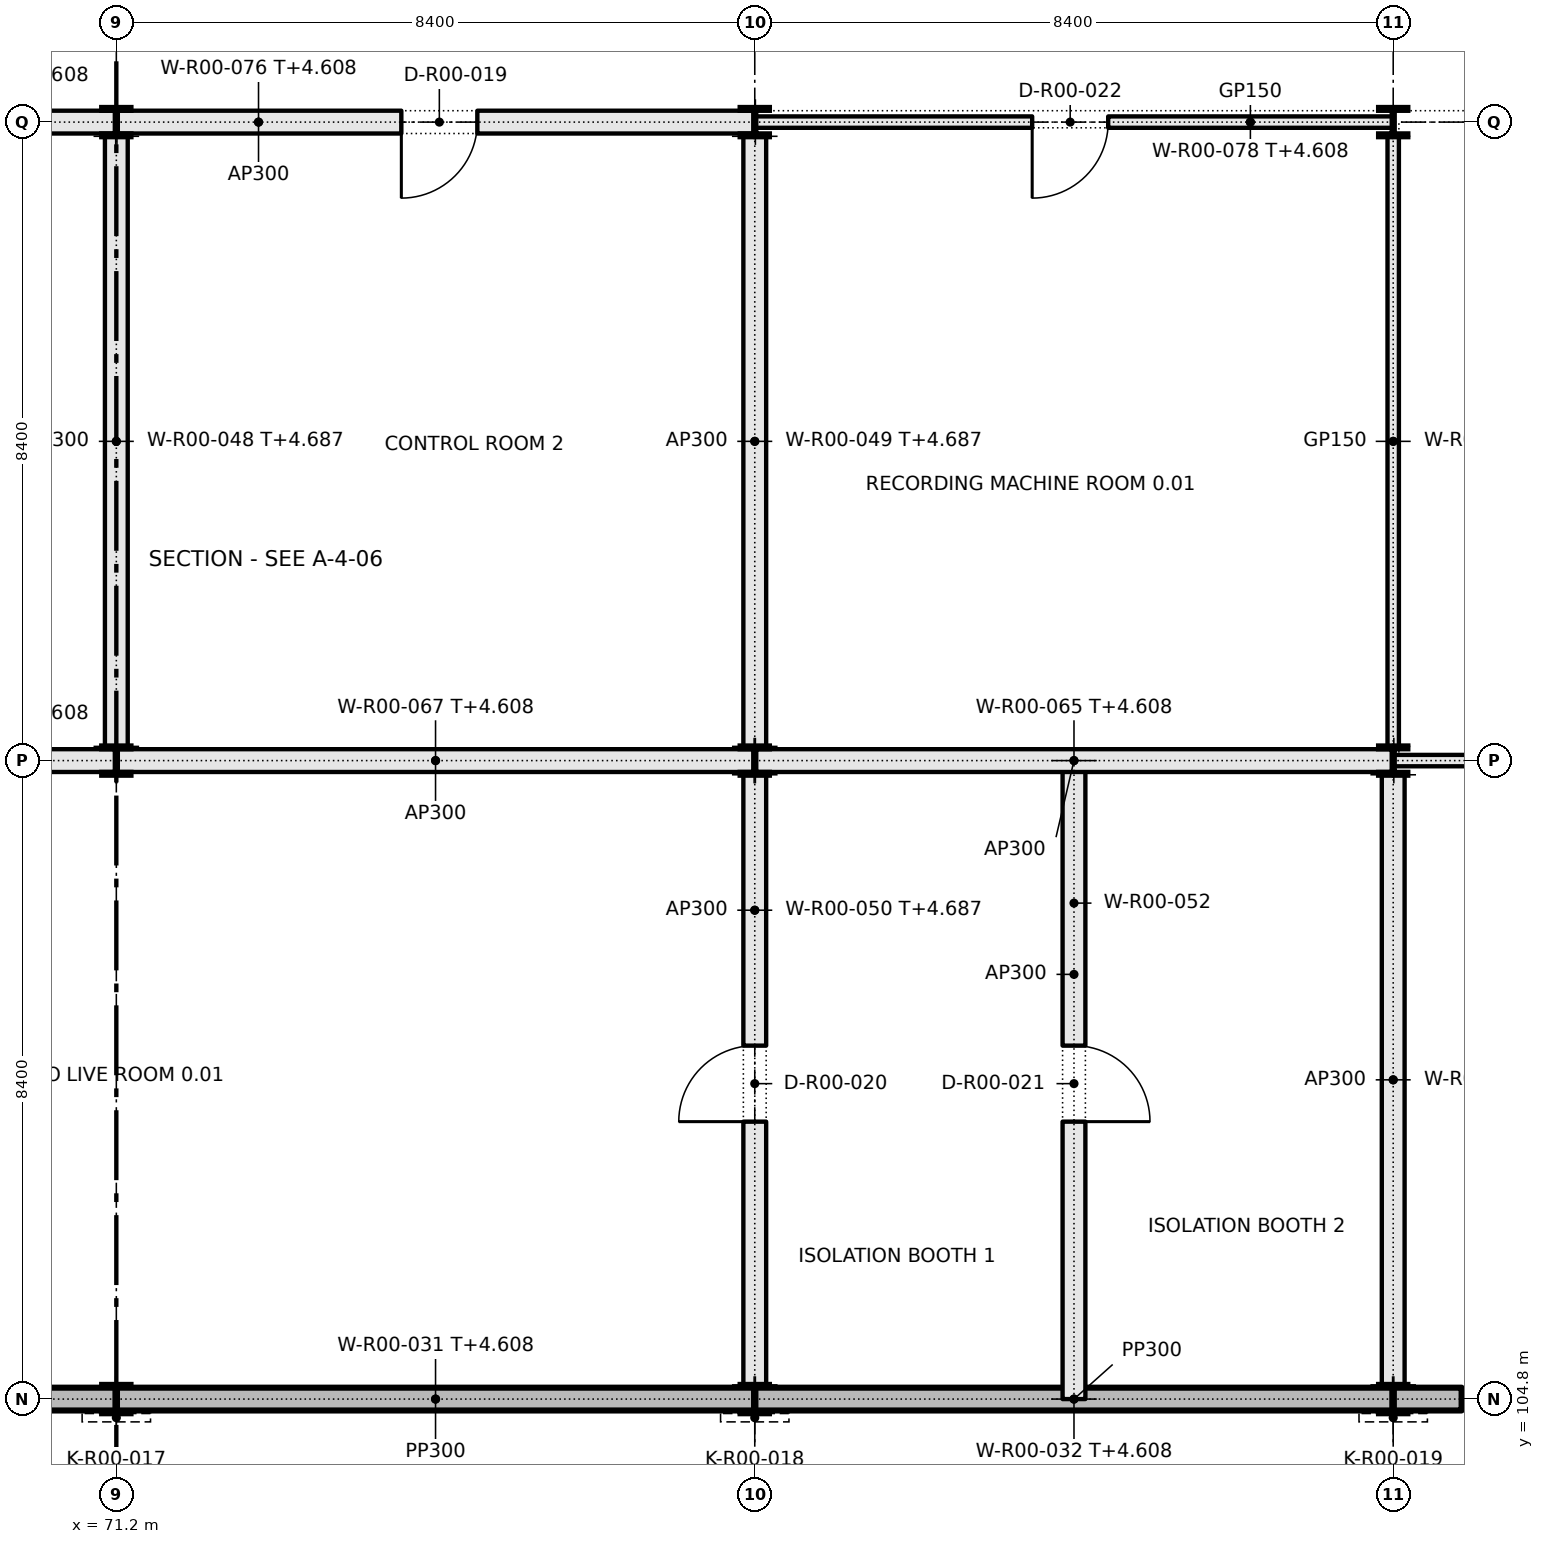
"""IFC4 building model, lengths in metres.
Left out: names, types, materials, properties, quantities, classifications, styles, units other than length and angle.
Written with IfcOpenShell. Run it as: python <this file> out.ifc"""

import sys

from ifc_helpers import new_model, si_unit, direction, frame, frame_2d, origin, origin_2d, place, context, subcontext, project, spatial, rectangle, i_section, extrude, element, fill, save


model = new_model("IFC4")
c1 = context("Model", 3, precision=1e-05, world=origin(), true_north=direction((0.0, 1.0)))
c2 = subcontext(c1, "Body", "Model", "MODEL_VIEW")
j1 = project(units=[si_unit("LENGTHUNIT", "METRE"), si_unit("PLANEANGLEUNIT", "RADIAN")], contexts=[c1])
p1 = place(None, origin())
s1 = spatial("IfcSite", under=j1, at=p1, CompositionType="ELEMENT")
p2 = place(p1, origin())
s2 = spatial("IfcBuilding", under=s1, at=p2, CompositionType="ELEMENT")
p3 = place(p2, origin())
s3 = spatial("IfcBuildingStorey", under=s2, at=p3, CompositionType="ELEMENT", Elevation=0.0)
for number, where, z_axis, x_axis in (
    (1, (71.2, 104.8, 0.0), (0.0, 0.0, 1.0), (1.0, 0.0, 0.0)),
    (2, (71.2, 113.2, 0.0), (0.0, 0.0, 1.0), (1.0, 0.0, 0.0)),
    (3, (71.2, 121.6, 0.0), (0.0, 0.0, 1.0), (1.0, 0.0, 0.0)),
    (4, (79.6, 104.8, 0.0), (0.0, 0.0, 1.0), (1.0, 0.0, 0.0)),
    (5, (79.6, 113.2, 0.0), (0.0, 0.0, 1.0), (1.0, 0.0, 0.0)),
    (6, (79.6, 121.6, 0.0), (0.0, 0.0, 1.0), (1.0, 0.0, 0.0)),
    (7, (88.0, 104.8, 0.0), (0.0, 0.0, 1.0), (1.0, 0.0, 0.0)),
    (8, (88.0, 113.2, 0.0), (0.0, 0.0, 1.0), (1.0, 0.0, 0.0)),
    (9, (88.0, 121.6, 0.0), (0.0, 0.0, 1.0), (1.0, 0.0, 0.0)),
):
    element("IfcColumn", number, at=place(p3, frame(where, z_axis=z_axis, x_axis=x_axis)), inside=s3, PredefinedType="COLUMN", context=c2, shape_type="SweptSolid", body=[
        extrude(i_section(OverallWidth=0.373, OverallDepth=0.373, WebThickness=0.016, FlangeThickness=0.026, FilletRadius=0.015, at=origin_2d()), origin(), (0.0, 0.0, 1.0), 5.4),
    ])
p4 = place(p3, frame((62.792, 104.8, 0.0), z_axis=(0.0, 0.0, 1.0), x_axis=(1.0, 0.0, 0.0)))
e10 = element("IfcWall", 10, at=p4, inside=s3, PredefinedType="SOLIDWALL", context=c2, shape_type="SweptSolid", body=[
    extrude(rectangle(XDim=8.417, YDim=0.3, at=frame_2d((4.208, 0.0))), origin(), (0.0, 0.0, 1.0), 4.608),
])
p5 = place(p3, frame((71.192, 104.8, 0.0), z_axis=(0.0, 0.0, 1.0), x_axis=(1.0, 0.0, 0.0)))
e11 = element("IfcWall", 11, at=p5, inside=s3, PredefinedType="SOLIDWALL", context=c2, shape_type="SweptSolid", body=[
    extrude(rectangle(XDim=8.416, YDim=0.3, at=frame_2d((4.208, 0.0))), origin(), (0.0, 0.0, 1.0), 4.608),
])
p6 = place(p3, frame((79.592, 104.8, 0.0), z_axis=(0.0, 0.0, 1.0), x_axis=(1.0, 0.0, 0.0)))
e12 = element("IfcWall", 12, at=p6, inside=s3, PredefinedType="SOLIDWALL", context=c2, shape_type="SweptSolid", body=[
    extrude(rectangle(XDim=8.417, YDim=0.3, at=frame_2d((4.208, 0.0))), origin(), (0.0, 0.0, 1.0), 4.608),
])
p7 = place(p3, frame((87.992, 104.8, 0.0), z_axis=(0.0, 0.0, 1.0), x_axis=(1.0, 0.0, 0.0)))
e13 = element("IfcWall", 13, at=p7, inside=s3, PredefinedType="SOLIDWALL", context=c2, shape_type="SweptSolid", body=[
    extrude(rectangle(XDim=8.417, YDim=0.3, at=frame_2d((4.208, 0.0))), origin(), (0.0, 0.0, 1.0), 4.608),
])
p8 = place(p7, frame((0.908, 0.0, 0.95)))
e14 = element("IfcOpeningElement", 14, at=p8, cuts=e13, PredefinedType="OPENING", context=c2, shape_type="SweptSolid", body=[
    extrude(rectangle(XDim=2.4, YDim=1.8, at=frame_2d((1.2, 0.9))), frame((0.0, 0.16, 0.0), z_axis=(0.0, -1.0, 0.0), x_axis=(1.0, 0.0, 0.0)), (0.0, 0.0, 1.0), 0.32),
])
p9 = place(p7, frame((5.108, 0.0, 0.95)))
e15 = element("IfcOpeningElement", 15, at=p9, cuts=e13, PredefinedType="OPENING", context=c2, shape_type="SweptSolid", body=[
    extrude(rectangle(XDim=2.4, YDim=1.8, at=frame_2d((1.2, 0.9))), frame((0.0, 0.16, 0.0), z_axis=(0.0, -1.0, 0.0), x_axis=(1.0, 0.0, 0.0)), (0.0, 0.0, 1.0), 0.32),
])
for number, where, z_axis, x_axis in (
    (16, (71.2, 113.387, 0.0), (0.0, 0.0, 1.0), (0.0, 1.0, 0.0)),
    (17, (79.6, 113.387, 0.0), (0.0, 0.0, 1.0), (0.0, 1.0, 0.0)),
):
    element("IfcWall", number, at=place(p3, frame(where, z_axis=z_axis, x_axis=x_axis)), inside=s3, PredefinedType="PARTITIONING", context=c2, shape_type="SweptSolid", body=[
        extrude(rectangle(XDim=8.027, YDim=0.3, at=frame_2d((4.013, 0.0))), origin(), (0.0, 0.0, 1.0), 4.687),
    ])
p10 = place(p3, frame((79.6, 104.987, 0.0), z_axis=(0.0, 0.0, 1.0), x_axis=(0.0, 1.0, 0.0)))
e18 = element("IfcWall", 18, at=p10, inside=s3, PredefinedType="PARTITIONING", context=c2, shape_type="SweptSolid", body=[
    extrude(rectangle(XDim=8.027, YDim=0.3, at=frame_2d((4.013, 0.0))), origin(), (0.0, 0.0, 1.0), 4.687),
])
p11 = place(p10, frame((3.463, 0.0, 0.0)))
e19 = element("IfcOpeningElement", 19, at=p11, cuts=e18, PredefinedType="OPENING", context=c2, shape_type="SweptSolid", body=[
    extrude(rectangle(XDim=1.0, YDim=2.1, at=frame_2d((0.5, 1.05))), frame((0.0, 0.16, 0.0), z_axis=(0.0, -1.0, 0.0), x_axis=(1.0, 0.0, 0.0)), (0.0, 0.0, 1.0), 0.32),
])
p12 = place(p3, frame((83.8, 104.8, 0.0), z_axis=(0.0, 0.0, 1.0), x_axis=(0.0, 1.0, 0.0)))
e20 = element("IfcWall", 20, at=p12, inside=s3, PredefinedType="PARTITIONING", context=c2, shape_type="SweptSolid", body=[
    extrude(rectangle(XDim=8.4, YDim=0.3, at=frame_2d((4.2, 0.0))), origin(), (0.0, 0.0, 1.0), 5.4),
])
p13 = place(p12, frame((3.65, 0.0, 0.0)))
e21 = element("IfcOpeningElement", 21, at=p13, cuts=e20, PredefinedType="OPENING", context=c2, shape_type="SweptSolid", body=[
    extrude(rectangle(XDim=1.0, YDim=2.1, at=frame_2d((0.5, 1.05))), frame((0.0, 0.16, 0.0), z_axis=(0.0, -1.0, 0.0), x_axis=(1.0, 0.0, 0.0)), (0.0, 0.0, 1.0), 0.32),
])
p14 = place(p3, frame((88.0, 104.987, 0.0), z_axis=(0.0, 0.0, 1.0), x_axis=(0.0, 1.0, 0.0)))
e22 = element("IfcWall", 22, at=p14, inside=s3, PredefinedType="PARTITIONING", context=c2, shape_type="SweptSolid", body=[
    extrude(rectangle(XDim=8.027, YDim=0.3, at=frame_2d((4.013, 0.0))), origin(), (0.0, 0.0, 1.0), 4.687),
])
p15 = place(p3, frame((88.0, 113.387, 0.0), z_axis=(0.0, 0.0, 1.0), x_axis=(0.0, 1.0, 0.0)))
e23 = element("IfcWall", 23, at=p15, inside=s3, PredefinedType="PARTITIONING", context=c2, shape_type="SweptSolid", body=[
    extrude(rectangle(XDim=8.027, YDim=0.15, at=frame_2d((4.013, 0.0))), origin(), (0.0, 0.0, 1.0), 4.687),
])
p16 = place(p3, frame((79.592, 113.2, 0.0), z_axis=(0.0, 0.0, 1.0), x_axis=(1.0, 0.0, 0.0)))
e24 = element("IfcWall", 24, at=p16, inside=s3, PredefinedType="PARTITIONING", context=c2, shape_type="SweptSolid", body=[
    extrude(rectangle(XDim=8.417, YDim=0.3, at=frame_2d((4.208, 0.0))), origin(), (0.0, 0.0, 1.0), 4.608),
])
p17 = place(p3, frame((62.792, 113.2, 0.0), z_axis=(0.0, 0.0, 1.0), x_axis=(1.0, 0.0, 0.0)))
e25 = element("IfcWall", 25, at=p17, inside=s3, PredefinedType="PARTITIONING", context=c2, shape_type="SweptSolid", body=[
    extrude(rectangle(XDim=8.417, YDim=0.3, at=frame_2d((4.208, 0.0))), origin(), (0.0, 0.0, 1.0), 4.608),
])
p18 = place(p17, frame((3.658, 0.0, 0.0)))
e26 = element("IfcOpeningElement", 26, at=p18, cuts=e25, PredefinedType="OPENING", context=c2, shape_type="SweptSolid", body=[
    extrude(rectangle(XDim=1.0, YDim=2.1, at=frame_2d((0.5, 1.05))), frame((0.0, 0.16, 0.0), z_axis=(0.0, -1.0, 0.0), x_axis=(1.0, 0.0, 0.0)), (0.0, 0.0, 1.0), 0.32),
])
p19 = place(p3, frame((71.192, 113.2, 0.0), z_axis=(0.0, 0.0, 1.0), x_axis=(1.0, 0.0, 0.0)))
e27 = element("IfcWall", 27, at=p19, inside=s3, PredefinedType="PARTITIONING", context=c2, shape_type="SweptSolid", body=[
    extrude(rectangle(XDim=8.416, YDim=0.3, at=frame_2d((4.208, 0.0))), origin(), (0.0, 0.0, 1.0), 4.608),
])
p20 = place(p3, frame((87.992, 113.2, 0.0), z_axis=(0.0, 0.0, 1.0), x_axis=(1.0, 0.0, 0.0)))
e28 = element("IfcWall", 28, at=p20, inside=s3, PredefinedType="PARTITIONING", context=c2, shape_type="SweptSolid", body=[
    extrude(rectangle(XDim=8.417, YDim=0.15, at=frame_2d((4.208, 0.0))), origin(), (0.0, 0.0, 1.0), 4.608),
])
p21 = place(p20, frame((3.658, 0.0, 0.0)))
e29 = element("IfcOpeningElement", 29, at=p21, cuts=e28, PredefinedType="OPENING", context=c2, shape_type="SweptSolid", body=[
    extrude(rectangle(XDim=1.0, YDim=2.1, at=frame_2d((0.5, 1.05))), frame((0.0, 0.085, 0.0), z_axis=(0.0, -1.0, 0.0), x_axis=(1.0, 0.0, 0.0)), (0.0, 0.0, 1.0), 0.17),
])
p22 = place(p3, frame((62.808, 121.6, 0.0), z_axis=(0.0, 0.0, 1.0), x_axis=(1.0, 0.0, 0.0)))
e30 = element("IfcWall", 30, at=p22, inside=s3, PredefinedType="PARTITIONING", context=c2, shape_type="SweptSolid", body=[
    extrude(rectangle(XDim=8.4, YDim=0.3, at=frame_2d((4.2, 0.0))), origin(), (0.0, 0.0, 1.0), 4.608),
])
p23 = place(p22, frame((3.642, 0.0, 0.0)))
e31 = element("IfcOpeningElement", 31, at=p23, cuts=e30, PredefinedType="OPENING", context=c2, shape_type="SweptSolid", body=[
    extrude(rectangle(XDim=1.0, YDim=2.1, at=frame_2d((0.5, 1.05))), frame((0.0, 0.16, 0.0), z_axis=(0.0, -1.0, 0.0), x_axis=(1.0, 0.0, 0.0)), (0.0, 0.0, 1.0), 0.32),
])
p24 = place(p3, frame((71.192, 121.6, 0.0), z_axis=(0.0, 0.0, 1.0), x_axis=(1.0, 0.0, 0.0)))
e32 = element("IfcWall", 32, at=p24, inside=s3, PredefinedType="PARTITIONING", context=c2, shape_type="SweptSolid", body=[
    extrude(rectangle(XDim=8.416, YDim=0.3, at=frame_2d((4.208, 0.0))), origin(), (0.0, 0.0, 1.0), 4.608),
])
p25 = place(p24, frame((3.758, 0.0, 0.0)))
e33 = element("IfcOpeningElement", 33, at=p25, cuts=e32, PredefinedType="OPENING", context=c2, shape_type="SweptSolid", body=[
    extrude(rectangle(XDim=1.0, YDim=2.1, at=frame_2d((0.5, 1.05))), frame((0.0, 0.16, 0.0), z_axis=(0.0, -1.0, 0.0), x_axis=(1.0, 0.0, 0.0)), (0.0, 0.0, 1.0), 0.32),
])
p26 = place(p3, frame((79.592, 121.6, 0.0), z_axis=(0.0, 0.0, 1.0), x_axis=(1.0, 0.0, 0.0)))
e34 = element("IfcWall", 34, at=p26, inside=s3, PredefinedType="PARTITIONING", context=c2, shape_type="SweptSolid", body=[
    extrude(rectangle(XDim=8.4, YDim=0.15, at=frame_2d((4.2, 0.0))), origin(), (0.0, 0.0, 1.0), 4.608),
])
p27 = place(p26, frame((3.658, 0.0, 0.0)))
e35 = element("IfcOpeningElement", 35, at=p27, cuts=e34, PredefinedType="OPENING", context=c2, shape_type="SweptSolid", body=[
    extrude(rectangle(XDim=1.0, YDim=2.1, at=frame_2d((0.5, 1.05))), frame((0.0, 0.085, 0.0), z_axis=(0.0, -1.0, 0.0), x_axis=(1.0, 0.0, 0.0)), (0.0, 0.0, 1.0), 0.17),
])
p28 = place(p8, origin())
e36 = element("IfcWindow", 36, at=p28, inside=s3, PartitioningType="DOUBLE_PANEL_VERTICAL", PredefinedType="WINDOW", context=c2, shape_type="SweptSolid", body=[
    extrude(rectangle(XDim=2.4, YDim=1.8, at=frame_2d((1.2, 0.9))), frame((0.0, 0.03, 0.0), z_axis=(0.0, -1.0, 0.0), x_axis=(1.0, 0.0, 0.0)), (0.0, 0.0, 1.0), 0.06),
])
fill(e14, e36)
p29 = place(p25, frame((1.0, 0.0, 0.0), z_axis=(0.0, 0.0, 1.0), x_axis=(-1.0, 0.0, 0.0)))
e37 = element("IfcDoor", 37, at=p29, inside=s3, OperationType="SINGLE_SWING_RIGHT", PredefinedType="DOOR", context=c2, shape_type="SweptSolid", body=[
    extrude(rectangle(XDim=1.0, YDim=2.1, at=frame_2d((0.5, 1.05))), frame((0.0, 0.025, 0.0), z_axis=(0.0, -1.0, 0.0), x_axis=(1.0, 0.0, 0.0)), (0.0, 0.0, 1.0), 0.05),
])
fill(e33, e37)
p30 = place(p11, origin())
e38 = element("IfcDoor", 38, at=p30, inside=s3, OperationType="SINGLE_SWING_LEFT", PredefinedType="DOOR", context=c2, shape_type="SweptSolid", body=[
    extrude(rectangle(XDim=1.0, YDim=2.1, at=frame_2d((0.5, 1.05))), frame((0.0, 0.025, 0.0), z_axis=(0.0, -1.0, 0.0), x_axis=(1.0, 0.0, 0.0)), (0.0, 0.0, 1.0), 0.05),
])
fill(e19, e38)
p31 = place(p13, frame((1.0, 0.0, 0.0), z_axis=(0.0, 0.0, 1.0), x_axis=(-1.0, 0.0, 0.0)))
e39 = element("IfcDoor", 39, at=p31, inside=s3, OperationType="SINGLE_SWING_RIGHT", PredefinedType="DOOR", context=c2, shape_type="SweptSolid", body=[
    extrude(rectangle(XDim=1.0, YDim=2.1, at=frame_2d((0.5, 1.05))), frame((0.0, 0.025, 0.0), z_axis=(0.0, -1.0, 0.0), x_axis=(1.0, 0.0, 0.0)), (0.0, 0.0, 1.0), 0.05),
])
fill(e21, e39)
p32 = place(p27, frame((1.0, 0.0, 0.0), z_axis=(0.0, 0.0, 1.0), x_axis=(-1.0, 0.0, 0.0)))
e40 = element("IfcDoor", 40, at=p32, inside=s3, OperationType="SINGLE_SWING_RIGHT", PredefinedType="DOOR", context=c2, shape_type="SweptSolid", body=[
    extrude(rectangle(XDim=1.0, YDim=2.1, at=frame_2d((0.5, 1.05))), frame((0.0, 0.025, 0.0), z_axis=(0.0, -1.0, 0.0), x_axis=(1.0, 0.0, 0.0)), (0.0, 0.0, 1.0), 0.05),
])
fill(e35, e40)
save(model, sys.argv[1])
